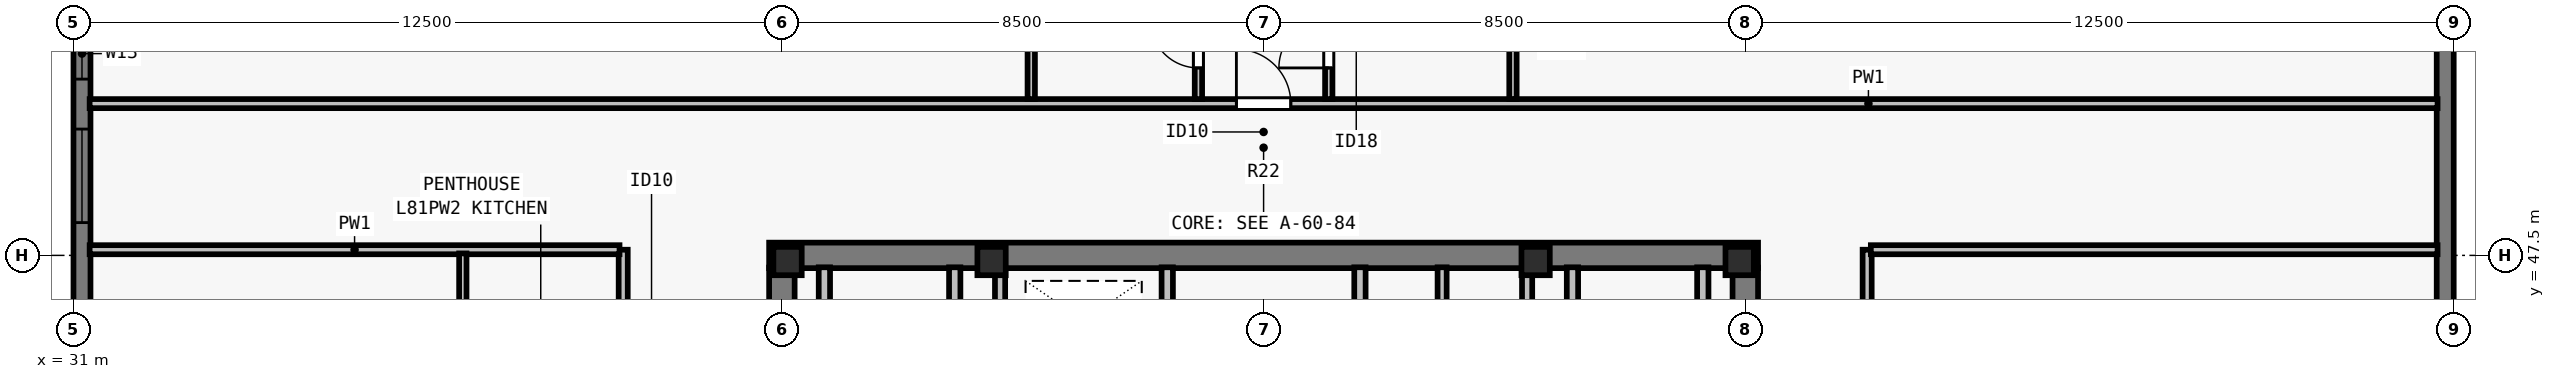
"""IFC4 building model, lengths in metres.
Left out: names, types, materials, properties, quantities, classifications, styles, units other than length and angle.
Written with IfcOpenShell. Run it as: python <this file> out.ifc"""

import sys

from ifc_helpers import new_model, si_unit, direction, frame, frame_2d, origin, origin_2d, place, context, subcontext, project, spatial, rectangle, i_section, extrude, element, fill, save


model = new_model("IFC4")
c1 = context("Model", 3, precision=1e-05, world=origin(), true_north=direction((0.0, 1.0)))
c2 = subcontext(c1, "Body", "Model", "MODEL_VIEW")
j1 = project(units=[si_unit("LENGTHUNIT", "METRE"), si_unit("PLANEANGLEUNIT", "RADIAN")], contexts=[c1])
p1 = place(None, origin())
s1 = spatial("IfcSite", under=j1, at=p1, CompositionType="ELEMENT")
p2 = place(p1, origin())
s2 = spatial("IfcBuilding", under=s1, at=p2, CompositionType="ELEMENT")
p3 = place(p2, frame((0.0, 0.0, 294.5)))
s3 = spatial("IfcBuildingStorey", under=s2, at=p3, CompositionType="ELEMENT", Elevation=294.5)
for number, where, z_axis, x_axis in (
    (1, (43.6, 47.4, 0.0), (0.0, 0.0, 1.0), (1.0, 0.0, 0.0)),
    (2, (47.2, 47.4, 0.0), (0.0, 0.0, 1.0), (1.0, 0.0, 0.0)),
    (3, (56.8, 47.4, 0.0), (0.0, 0.0, 1.0), (1.0, 0.0, 0.0)),
    (4, (60.4, 47.4, 0.0), (0.0, 0.0, 1.0), (1.0, 0.0, 0.0)),
):
    element("IfcColumn", number, at=place(p3, frame(where, z_axis=z_axis, x_axis=x_axis)), inside=s3, PredefinedType="COLUMN", context=c2, shape_type="SweptSolid", body=[
        extrude(i_section(OverallWidth=0.5, OverallDepth=0.5, WebThickness=0.028, FlangeThickness=0.045, at=origin_2d()), origin(), (0.0, 0.0, 1.0), 3.5),
    ])
p4 = place(p3, frame((31.15, 23.5, 0.0), z_axis=(0.0, 0.0, 1.0), x_axis=(0.0, 1.0, 0.0)))
e5 = element("IfcWall", 5, at=p4, inside=s3, PredefinedType="SOLIDWALL", context=c2, shape_type="SweptSolid", body=[
    extrude(rectangle(XDim=30.722, YDim=0.3, at=frame_2d((15.361, 0.0))), origin(), (0.0, 0.0, 1.0), 3.29),
])
p5 = place(p4, frame((7.93, 0.0, 0.8)))
e6 = element("IfcOpeningElement", 6, at=p5, cuts=e5, PredefinedType="OPENING", context=c2, shape_type="SweptSolid", body=[
    extrude(rectangle(XDim=1.65, YDim=1.758, at=frame_2d((0.825, 0.879))), frame((0.0, 0.16, 0.0), z_axis=(0.0, -1.0, 0.0), x_axis=(1.0, 0.0, 0.0)), (0.0, 0.0, 1.0), 0.32),
])
p6 = place(p4, frame((12.442, 0.0, 0.8)))
e7 = element("IfcOpeningElement", 7, at=p6, cuts=e5, PredefinedType="OPENING", context=c2, shape_type="SweptSolid", body=[
    extrude(rectangle(XDim=2.0, YDim=1.758, at=frame_2d((1.0, 0.879))), frame((0.0, 0.16, 0.0), z_axis=(0.0, -1.0, 0.0), x_axis=(1.0, 0.0, 0.0)), (0.0, 0.0, 1.0), 0.32),
])
p7 = place(p4, frame((16.455, 0.0, 0.8)))
e8 = element("IfcOpeningElement", 8, at=p7, cuts=e5, PredefinedType="OPENING", context=c2, shape_type="SweptSolid", body=[
    extrude(rectangle(XDim=1.65, YDim=1.758, at=frame_2d((0.825, 0.879))), frame((0.0, 0.16, 0.0), z_axis=(0.0, -1.0, 0.0), x_axis=(1.0, 0.0, 0.0)), (0.0, 0.0, 1.0), 0.32),
])
p8 = place(p4, frame((20.967, 0.0, 0.8)))
e9 = element("IfcOpeningElement", 9, at=p8, cuts=e5, PredefinedType="OPENING", context=c2, shape_type="SweptSolid", body=[
    extrude(rectangle(XDim=2.0, YDim=1.758, at=frame_2d((1.0, 0.879))), frame((0.0, 0.16, 0.0), z_axis=(0.0, -1.0, 0.0), x_axis=(1.0, 0.0, 0.0)), (0.0, 0.0, 1.0), 0.32),
])
p9 = place(p4, frame((24.579, 0.0, 0.8)))
e10 = element("IfcOpeningElement", 10, at=p9, cuts=e5, PredefinedType="OPENING", context=c2, shape_type="SweptSolid", body=[
    extrude(rectangle(XDim=1.65, YDim=1.758, at=frame_2d((0.825, 0.879))), frame((0.0, 0.16, 0.0), z_axis=(0.0, -1.0, 0.0), x_axis=(1.0, 0.0, 0.0)), (0.0, 0.0, 1.0), 0.32),
])
p10 = place(p4, frame((27.11, 0.0, 0.8)))
e11 = element("IfcOpeningElement", 11, at=p10, cuts=e5, PredefinedType="OPENING", context=c2, shape_type="SweptSolid", body=[
    extrude(rectangle(XDim=0.9, YDim=1.75, at=frame_2d((0.45, 0.875))), frame((0.0, 0.16, 0.0), z_axis=(0.0, -1.0, 0.0), x_axis=(1.0, 0.0, 0.0)), (0.0, 0.0, 1.0), 0.32),
])
p11 = place(p3, frame((72.85, 54.5, 0.0), z_axis=(0.0, 0.0, 1.0), x_axis=(0.0, -1.0, 0.0)))
e12 = element("IfcWall", 12, at=p11, inside=s3, PredefinedType="SOLIDWALL", context=c2, shape_type="SweptSolid", body=[
    extrude(rectangle(XDim=21.422, YDim=0.3, at=frame_2d((10.711, 0.0))), origin(), (0.0, 0.0, 1.0), 3.29),
])
p12 = place(p11, frame((8.296, 0.0, 0.8)))
e13 = element("IfcOpeningElement", 13, at=p12, cuts=e12, PredefinedType="OPENING", context=c2, shape_type="SweptSolid", body=[
    extrude(rectangle(XDim=1.65, YDim=1.758, at=frame_2d((0.825, 0.879))), frame((0.0, 0.16, 0.0), z_axis=(0.0, -1.0, 0.0), x_axis=(1.0, 0.0, 0.0)), (0.0, 0.0, 1.0), 0.32),
])
p13 = place(p11, frame((13.051, 0.0, 0.8)))
e14 = element("IfcOpeningElement", 14, at=p13, cuts=e12, PredefinedType="OPENING", context=c2, shape_type="SweptSolid", body=[
    extrude(rectangle(XDim=2.0, YDim=1.758, at=frame_2d((1.0, 0.879))), frame((0.0, 0.16, 0.0), z_axis=(0.0, -1.0, 0.0), x_axis=(1.0, 0.0, 0.0)), (0.0, 0.0, 1.0), 0.32),
])
p14 = place(p11, frame((17.307, 0.0, 0.8)))
e15 = element("IfcOpeningElement", 15, at=p14, cuts=e12, PredefinedType="OPENING", context=c2, shape_type="SweptSolid", body=[
    extrude(rectangle(XDim=1.65, YDim=1.758, at=frame_2d((0.825, 0.879))), frame((0.0, 0.16, 0.0), z_axis=(0.0, -1.0, 0.0), x_axis=(1.0, 0.0, 0.0)), (0.0, 0.0, 1.0), 0.32),
])
p15 = place(p3, frame((43.275, 47.5, 0.0), z_axis=(0.0, 0.0, 1.0), x_axis=(1.0, 0.0, 0.0)))
e16 = element("IfcWall", 16, at=p15, inside=s3, PredefinedType="SHEAR", context=c2, shape_type="SweptSolid", body=[
    extrude(rectangle(XDim=17.45, YDim=0.45, at=frame_2d((8.725, 0.0))), origin(), (0.0, 0.0, 1.0), 3.29),
])
for number, where, z_axis, x_axis in (
    (17, (43.5, 40.8, 0.0), (0.0, 0.0, 1.0), (0.0, 1.0, 0.0)),
    (18, (60.5, 40.8, 0.0), (0.0, 0.0, 1.0), (0.0, 1.0, 0.0)),
):
    element("IfcWall", number, at=place(p3, frame(where, z_axis=z_axis, x_axis=x_axis)), inside=s3, PredefinedType="SHEAR", context=c2, shape_type="SweptSolid", body=[
        extrude(rectangle(XDim=6.485, YDim=0.45, at=frame_2d((3.242, 0.0))), origin(), (0.0, 0.0, 1.0), 3.29),
    ])
p16 = place(p3, frame((50.3, 40.585, 0.0), z_axis=(0.0, 0.0, 1.0), x_axis=(0.0, 1.0, 0.0)))
e19 = element("IfcWall", 19, at=p16, inside=s3, PredefinedType="SOLIDWALL", context=c2, shape_type="SweptSolid", body=[
    extrude(rectangle(XDim=6.705, YDim=0.2, at=frame_2d((3.353, 0.0))), origin(), (0.0, 0.0, 1.0), 3.29),
])
p17 = place(p16, frame((0.515, 0.0, 0.0)))
e20 = element("IfcOpeningElement", 20, at=p17, cuts=e19, PredefinedType="OPENING", context=c2, shape_type="SweptSolid", body=[
    extrude(rectangle(XDim=1.1, YDim=2.2, at=frame_2d((0.55, 1.1))), frame((0.0, 0.11, 0.0), z_axis=(0.0, -1.0, 0.0), x_axis=(1.0, 0.0, 0.0)), (0.0, 0.0, 1.0), 0.22),
])
p18 = place(p16, frame((3.015, 0.0, 0.0)))
e21 = element("IfcOpeningElement", 21, at=p18, cuts=e19, PredefinedType="OPENING", context=c2, shape_type="SweptSolid", body=[
    extrude(rectangle(XDim=1.1, YDim=2.2, at=frame_2d((0.55, 1.1))), frame((0.0, 0.11, 0.0), z_axis=(0.0, -1.0, 0.0), x_axis=(1.0, 0.0, 0.0)), (0.0, 0.0, 1.0), 0.22),
])
p19 = place(p16, frame((5.065, 0.0, 0.0)))
e22 = element("IfcOpeningElement", 22, at=p19, cuts=e19, PredefinedType="OPENING", context=c2, shape_type="SweptSolid", body=[
    extrude(rectangle(XDim=0.8, YDim=2.08, at=frame_2d((0.4, 1.04))), frame((0.0, 0.11, 0.0), z_axis=(0.0, -1.0, 0.0), x_axis=(1.0, 0.0, 0.0)), (0.0, 0.0, 1.0), 0.22),
])
p20 = place(p3, frame((53.7, 40.585, 0.0), z_axis=(0.0, 0.0, 1.0), x_axis=(0.0, 1.0, 0.0)))
e23 = element("IfcWall", 23, at=p20, inside=s3, PredefinedType="SOLIDWALL", context=c2, shape_type="SweptSolid", body=[
    extrude(rectangle(XDim=6.705, YDim=0.2, at=frame_2d((3.353, 0.0))), origin(), (0.0, 0.0, 1.0), 3.29),
])
p21 = place(p20, frame((0.195, 0.0, 0.0)))
e24 = element("IfcOpeningElement", 24, at=p21, cuts=e23, PredefinedType="OPENING", context=c2, shape_type="SweptSolid", body=[
    extrude(rectangle(XDim=0.8, YDim=2.08, at=frame_2d((0.4, 1.04))), frame((0.0, 0.11, 0.0), z_axis=(0.0, -1.0, 0.0), x_axis=(1.0, 0.0, 0.0)), (0.0, 0.0, 1.0), 0.22),
])
p22 = place(p20, frame((1.865, 0.0, 0.0)))
e25 = element("IfcOpeningElement", 25, at=p22, cuts=e23, PredefinedType="OPENING", context=c2, shape_type="SweptSolid", body=[
    extrude(rectangle(XDim=1.1, YDim=2.2, at=frame_2d((0.55, 1.1))), frame((0.0, 0.11, 0.0), z_axis=(0.0, -1.0, 0.0), x_axis=(1.0, 0.0, 0.0)), (0.0, 0.0, 1.0), 0.22),
])
p23 = place(p20, frame((4.265, 0.0, 0.0)))
e26 = element("IfcOpeningElement", 26, at=p23, cuts=e23, PredefinedType="OPENING", context=c2, shape_type="SweptSolid", body=[
    extrude(rectangle(XDim=0.95, YDim=2.12, at=frame_2d((0.475, 1.06))), frame((0.0, 0.11, 0.0), z_axis=(0.0, -1.0, 0.0), x_axis=(1.0, 0.0, 0.0)), (0.0, 0.0, 1.0), 0.22),
])
for number, where, z_axis, x_axis in (
    (27, (46.55, 43.735, 0.0), (0.0, 0.0, 1.0), (0.0, 1.0, 0.0)),
    (28, (44.25, 43.735, 0.0), (0.0, 0.0, 1.0), (0.0, 1.0, 0.0)),
    (29, (57.45, 43.735, 0.0), (0.0, 0.0, 1.0), (0.0, 1.0, 0.0)),
    (30, (59.75, 43.735, 0.0), (0.0, 0.0, 1.0), (0.0, 1.0, 0.0)),
):
    element("IfcWall", number, at=place(p3, frame(where, z_axis=z_axis, x_axis=x_axis)), inside=s3, PredefinedType="SOLIDWALL", context=c2, shape_type="SweptSolid", body=[
        extrude(rectangle(XDim=3.555, YDim=0.2, at=frame_2d((1.777, 0.0))), origin(), (0.0, 0.0, 1.0), 3.29),
    ])
for number, where, z_axis, x_axis in (
    (31, (47.35, 43.735, 0.0), (0.0, 0.0, 1.0), (0.0, 1.0, 0.0)),
    (32, (56.65, 43.735, 0.0), (0.0, 0.0, 1.0), (0.0, 1.0, 0.0)),
):
    element("IfcWall", number, at=place(p3, frame(where, z_axis=z_axis, x_axis=x_axis)), inside=s3, PredefinedType="SOLIDWALL", context=c2, shape_type="SweptSolid", body=[
        extrude(rectangle(XDim=3.555, YDim=0.18, at=frame_2d((1.777, 0.0))), origin(), (0.0, 0.0, 1.0), 3.29),
    ])
p24 = place(p3, frame((55.15, 44.195, 0.0), z_axis=(0.0, 0.0, 1.0), x_axis=(0.0, 1.0, 0.0)))
e33 = element("IfcWall", 33, at=p24, inside=s3, PredefinedType="PARTITIONING", context=c2, shape_type="SweptSolid", body=[
    extrude(rectangle(XDim=3.095, YDim=0.16, at=frame_2d((1.547, 0.0))), origin(), (0.0, 0.0, 1.0), 3.29),
])
p25 = place(p24, frame((1.025, 0.0, 0.0)))
e34 = element("IfcOpeningElement", 34, at=p25, cuts=e33, PredefinedType="OPENING", context=c2, shape_type="SweptSolid", body=[
    extrude(rectangle(XDim=0.8, YDim=2.1, at=frame_2d((0.4, 1.05))), frame((0.0, 0.09, 0.0), z_axis=(0.0, -1.0, 0.0), x_axis=(1.0, 0.0, 0.0)), (0.0, 0.0, 1.0), 0.18),
])
p26 = place(p3, frame((31.285, 50.177, 0.0), z_axis=(0.0, 0.0, 1.0), x_axis=(1.0, 0.0, 0.0)))
e35 = element("IfcWall", 35, at=p26, inside=s3, PredefinedType="PARTITIONING", context=c2, shape_type="SweptSolid", body=[
    extrude(rectangle(XDim=41.43, YDim=0.16, at=frame_2d((20.715, 0.0))), origin(), (0.0, 0.0, 1.0), 3.009),
])
p27 = place(p26, frame((20.235, 0.0, 0.0)))
e36 = element("IfcOpeningElement", 36, at=p27, cuts=e35, PredefinedType="OPENING", context=c2, shape_type="SweptSolid", body=[
    extrude(rectangle(XDim=0.96, YDim=2.18, at=frame_2d((0.48, 1.09))), frame((0.0, 0.09, 0.0), z_axis=(0.0, -1.0, 0.0), x_axis=(1.0, 0.0, 0.0)), (0.0, 0.0, 1.0), 0.18),
])
p28 = place(p3, frame((40.7, 30.4, 0.0), z_axis=(0.0, 0.0, 1.0), x_axis=(0.0, 1.0, 0.0)))
e37 = element("IfcWall", 37, at=p28, inside=s3, PredefinedType="PARTITIONING", context=c2, shape_type="SweptSolid", body=[
    extrude(rectangle(XDim=17.2, YDim=0.16, at=frame_2d((8.6, 0.0))), origin(), (0.0, 0.0, 1.0), 3.009),
])
p29 = place(p28, frame((3.82, 0.0, 0.0)))
e38 = element("IfcOpeningElement", 38, at=p29, cuts=e37, PredefinedType="OPENING", context=c2, shape_type="SweptSolid", body=[
    extrude(rectangle(XDim=0.96, YDim=2.18, at=frame_2d((0.48, 1.09))), frame((0.0, 0.09, 0.0), z_axis=(0.0, -1.0, 0.0), x_axis=(1.0, 0.0, 0.0)), (0.0, 0.0, 1.0), 0.18),
])
p30 = place(p28, frame((12.42, 0.0, 0.0)))
e39 = element("IfcOpeningElement", 39, at=p30, cuts=e37, PredefinedType="OPENING", context=c2, shape_type="SweptSolid", body=[
    extrude(rectangle(XDim=0.96, YDim=2.18, at=frame_2d((0.48, 1.09))), frame((0.0, 0.09, 0.0), z_axis=(0.0, -1.0, 0.0), x_axis=(1.0, 0.0, 0.0)), (0.0, 0.0, 1.0), 0.18),
])
p31 = place(p3, frame((62.65, 30.4, 0.0), z_axis=(0.0, 0.0, 1.0), x_axis=(0.0, 1.0, 0.0)))
e40 = element("IfcWall", 40, at=p31, inside=s3, PredefinedType="PARTITIONING", context=c2, shape_type="SweptSolid", body=[
    extrude(rectangle(XDim=17.2, YDim=0.16, at=frame_2d((8.6, 0.0))), origin(), (0.0, 0.0, 1.0), 3.29),
])
p32 = place(p31, frame((8.0, 0.0, 0.0)))
e41 = element("IfcOpeningElement", 41, at=p32, cuts=e40, PredefinedType="OPENING", context=c2, shape_type="SweptSolid", body=[
    extrude(rectangle(XDim=0.96, YDim=2.12, at=frame_2d((0.48, 1.06))), frame((0.0, 0.09, 0.0), z_axis=(0.0, -1.0, 0.0), x_axis=(1.0, 0.0, 0.0)), (0.0, 0.0, 1.0), 0.18),
])
p33 = place(p3, frame((31.285, 47.6, 0.0), z_axis=(0.0, 0.0, 1.0), x_axis=(1.0, 0.0, 0.0)))
e42 = element("IfcWall", 42, at=p33, inside=s3, PredefinedType="PARTITIONING", context=c2, shape_type="SweptSolid", body=[
    extrude(rectangle(XDim=9.35, YDim=0.16, at=frame_2d((4.675, 0.0))), origin(), (0.0, 0.0, 1.0), 3.29),
])
p34 = place(p3, frame((62.715, 47.6, 0.0), z_axis=(0.0, 0.0, 1.0), x_axis=(1.0, 0.0, 0.0)))
e43 = element("IfcWall", 43, at=p34, inside=s3, PredefinedType="PARTITIONING", context=c2, shape_type="SweptSolid", body=[
    extrude(rectangle(XDim=10.0, YDim=0.16, at=frame_2d((5.0, 0.0))), origin(), (0.0, 0.0, 1.0), 3.29),
])
p35 = place(p3, frame((47.9, 50.258, 0.0), z_axis=(0.0, 0.0, 1.0), x_axis=(0.0, 1.0, 0.0)))
e44 = element("IfcWall", 44, at=p35, inside=s3, PredefinedType="PLUMBINGWALL", context=c2, shape_type="SweptSolid", body=[
    extrude(rectangle(XDim=2.75, YDim=0.13, at=frame_2d((1.375, 0.0))), origin(), (0.0, 0.0, 1.0), 3.29),
])
p36 = place(p3, frame((50.85, 50.258, 0.0), z_axis=(0.0, 0.0, 1.0), x_axis=(0.0, 1.0, 0.0)))
e45 = element("IfcWall", 45, at=p36, inside=s3, PredefinedType="PLUMBINGWALL", context=c2, shape_type="SweptSolid", body=[
    extrude(rectangle(XDim=2.75, YDim=0.13, at=frame_2d((1.375, 0.0))), origin(), (0.0, 0.0, 1.0), 3.009),
])
p37 = place(p36, frame((0.55, 0.0, 0.0)))
e46 = element("IfcOpeningElement", 46, at=p37, cuts=e45, PredefinedType="OPENING", context=c2, shape_type="SweptSolid", body=[
    extrude(rectangle(XDim=0.85, YDim=2.08, at=frame_2d((0.425, 1.04))), frame((0.0, 0.075, 0.0), z_axis=(0.0, -1.0, 0.0), x_axis=(1.0, 0.0, 0.0)), (0.0, 0.0, 1.0), 0.15),
])
p38 = place(p3, frame((56.4, 50.258, 0.0), z_axis=(0.0, 0.0, 1.0), x_axis=(0.0, 1.0, 0.0)))
e47 = element("IfcWall", 47, at=p38, inside=s3, PredefinedType="PLUMBINGWALL", context=c2, shape_type="SweptSolid", body=[
    extrude(rectangle(XDim=2.75, YDim=0.13, at=frame_2d((1.375, 0.0))), origin(), (0.0, 0.0, 1.0), 3.29),
])
p39 = place(p3, frame((53.15, 50.258, 0.0), z_axis=(0.0, 0.0, 1.0), x_axis=(0.0, 1.0, 0.0)))
e48 = element("IfcWall", 48, at=p39, inside=s3, PredefinedType="PLUMBINGWALL", context=c2, shape_type="SweptSolid", body=[
    extrude(rectangle(XDim=2.75, YDim=0.13, at=frame_2d((1.375, 0.0))), origin(), (0.0, 0.0, 1.0), 3.29),
])
p40 = place(p39, frame((0.55, 0.0, 0.0)))
e49 = element("IfcOpeningElement", 49, at=p40, cuts=e48, PredefinedType="OPENING", context=c2, shape_type="SweptSolid", body=[
    extrude(rectangle(XDim=0.88, YDim=2.1, at=frame_2d((0.44, 1.05))), frame((0.0, 0.075, 0.0), z_axis=(0.0, -1.0, 0.0), x_axis=(1.0, 0.0, 0.0)), (0.0, 0.0, 1.0), 0.15),
])
p41 = place(p3, frame((37.87, 44.5, 0.0), z_axis=(0.0, 0.0, 1.0), x_axis=(0.0, 1.0, 0.0)))
e50 = element("IfcWall", 50, at=p41, inside=s3, PredefinedType="PLUMBINGWALL", context=c2, shape_type="SweptSolid", body=[
    extrude(rectangle(XDim=3.035, YDim=0.13, at=frame_2d((1.518, 0.0))), origin(), (0.0, 0.0, 1.0), 3.29),
])
p42 = place(p9, origin())
e51 = element("IfcWindow", 51, at=p42, inside=s3, PartitioningType="SINGLE_PANEL", PredefinedType="WINDOW", context=c2, shape_type="SweptSolid", body=[
    extrude(rectangle(XDim=1.65, YDim=1.758, at=frame_2d((0.825, 0.879))), frame((0.0, -0.05, 0.0), z_axis=(0.0, -1.0, 0.0), x_axis=(1.0, 0.0, 0.0)), (0.0, 0.0, 1.0), 0.06),
])
fill(e10, e51)
p43 = place(p10, origin())
e52 = element("IfcWindow", 52, at=p43, inside=s3, PartitioningType="SINGLE_PANEL", PredefinedType="WINDOW", context=c2, shape_type="SweptSolid", body=[
    extrude(rectangle(XDim=0.9, YDim=1.75, at=frame_2d((0.45, 0.875))), frame((0.0, -0.04, 0.0), z_axis=(0.0, -1.0, 0.0), x_axis=(1.0, 0.0, 0.0)), (0.0, 0.0, 1.0), 0.06),
])
fill(e11, e52)
p44 = place(p37, origin())
e53 = element("IfcDoor", 53, at=p44, inside=s3, OperationType="SINGLE_SWING_RIGHT", PredefinedType="DOOR", context=c2, shape_type="SweptSolid", body=[
    extrude(rectangle(XDim=0.85, YDim=2.08, at=frame_2d((0.425, 1.04))), frame((0.0, 0.025, 0.0), z_axis=(0.0, -1.0, 0.0), x_axis=(1.0, 0.0, 0.0)), (0.0, 0.0, 1.0), 0.05),
])
fill(e46, e53)
p45 = place(p40, origin())
e54 = element("IfcDoor", 54, at=p45, inside=s3, OperationType="SINGLE_SWING_LEFT", PredefinedType="DOOR", context=c2, shape_type="SweptSolid", body=[
    extrude(rectangle(XDim=0.88, YDim=2.1, at=frame_2d((0.44, 1.05))), frame((0.0, 0.025, 0.0), z_axis=(0.0, -1.0, 0.0), x_axis=(1.0, 0.0, 0.0)), (0.0, 0.0, 1.0), 0.05),
])
fill(e49, e54)
p46 = place(p27, origin())
e55 = element("IfcDoor", 55, at=p46, inside=s3, OperationType="SINGLE_SWING_LEFT", PredefinedType="DOOR", context=c2, shape_type="SweptSolid", body=[
    extrude(rectangle(XDim=0.96, YDim=2.18, at=frame_2d((0.48, 1.09))), frame((0.0, 0.025, 0.0), z_axis=(0.0, -1.0, 0.0), x_axis=(1.0, 0.0, 0.0)), (0.0, 0.0, 1.0), 0.05),
])
fill(e36, e55)
save(model, sys.argv[1])
